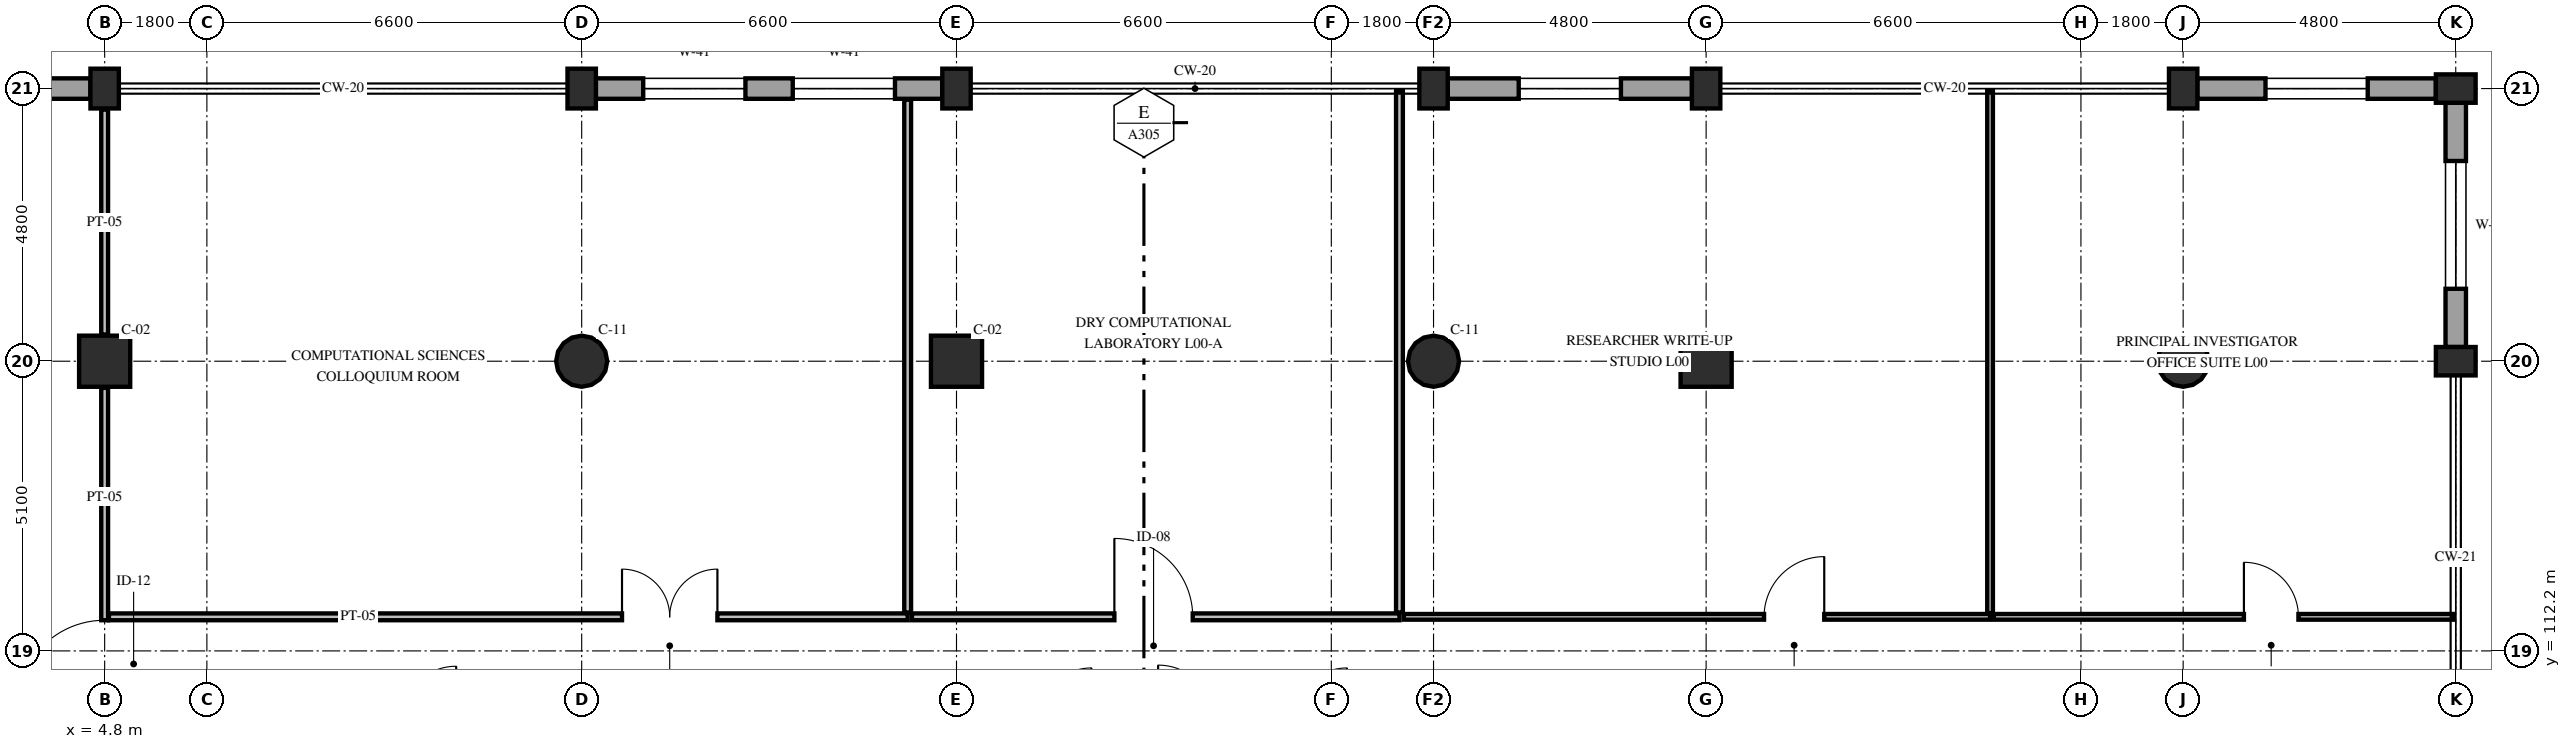
"""IFC4 building model, lengths in metres.
Left out: names, types, materials, properties, quantities, classifications, styles, units other than length and angle.
Written with IfcOpenShell. Run it as: python <this file> out.ifc"""

import sys

from ifc_helpers import new_model, si_unit, direction, frame, frame_2d, origin, origin_2d, place, context, subcontext, project, spatial, rectangle, circle, extrude, element, fill, save


model = new_model("IFC4")
c1 = context("Model", 3, precision=1e-05, world=origin(), true_north=direction((0.0, 1.0)))
c2 = subcontext(c1, "Body", "Model", "MODEL_VIEW")
j1 = project(units=[si_unit("LENGTHUNIT", "METRE"), si_unit("PLANEANGLEUNIT", "RADIAN")], contexts=[c1])
p1 = place(None, origin())
s1 = spatial("IfcSite", under=j1, at=p1, CompositionType="ELEMENT")
p2 = place(p1, origin())
s2 = spatial("IfcBuilding", under=s1, at=p2, CompositionType="ELEMENT")
p3 = place(p2, origin())
s3 = spatial("IfcBuildingStorey", under=s2, at=p3, CompositionType="ELEMENT", Elevation=0.0)
p4 = place(p3, frame((4.8, 117.3, 0.0), z_axis=(0.0, 0.0, 1.0), x_axis=(1.0, 0.0, 0.0)))
e1 = element("IfcColumn", 1, at=p4, inside=s3, PredefinedType="COLUMN", context=c2, shape_type="SweptSolid", body=[
    extrude(rectangle(XDim=0.9, YDim=0.9, at=origin_2d()), origin(), (0.0, 0.0, 1.0), 5.4),
])
p5 = place(p3, frame((4.8, 122.1, 0.0), z_axis=(0.0, 0.0, 1.0), x_axis=(1.0, 0.0, 0.0)))
e2 = element("IfcColumn", 2, at=p5, inside=s3, PredefinedType="PILASTER", context=c2, shape_type="SweptSolid", body=[
    extrude(rectangle(XDim=0.5, YDim=0.7, at=origin_2d()), origin(), (0.0, 0.0, 1.0), 5.4),
])
p6 = place(p3, frame((13.2, 117.3, 0.0), z_axis=(0.0, 0.0, 1.0), x_axis=(1.0, 0.0, 0.0)))
e3 = element("IfcColumn", 3, at=p6, inside=s3, PredefinedType="COLUMN", context=c2, shape_type="SweptSolid", body=[
    extrude(circle(Radius=0.45, at=origin_2d()), origin(), (0.0, 0.0, 1.0), 5.4),
])
p7 = place(p3, frame((13.2, 122.1, 0.0), z_axis=(0.0, 0.0, 1.0), x_axis=(1.0, 0.0, 0.0)))
e4 = element("IfcColumn", 4, at=p7, inside=s3, PredefinedType="PILASTER", context=c2, shape_type="SweptSolid", body=[
    extrude(rectangle(XDim=0.5, YDim=0.7, at=origin_2d()), origin(), (0.0, 0.0, 1.0), 5.4),
])
p8 = place(p3, frame((19.8, 117.3, 0.0), z_axis=(0.0, 0.0, 1.0), x_axis=(1.0, 0.0, 0.0)))
e5 = element("IfcColumn", 5, at=p8, inside=s3, PredefinedType="COLUMN", context=c2, shape_type="SweptSolid", body=[
    extrude(rectangle(XDim=0.9, YDim=0.9, at=origin_2d()), origin(), (0.0, 0.0, 1.0), 5.4),
])
p9 = place(p3, frame((19.8, 122.1, 0.0), z_axis=(0.0, 0.0, 1.0), x_axis=(1.0, 0.0, 0.0)))
e6 = element("IfcColumn", 6, at=p9, inside=s3, PredefinedType="PILASTER", context=c2, shape_type="SweptSolid", body=[
    extrude(rectangle(XDim=0.5, YDim=0.7, at=origin_2d()), origin(), (0.0, 0.0, 1.0), 5.4),
])
p10 = place(p3, frame((28.2, 117.3, 0.0), z_axis=(0.0, 0.0, 1.0), x_axis=(1.0, 0.0, 0.0)))
e7 = element("IfcColumn", 7, at=p10, inside=s3, PredefinedType="COLUMN", context=c2, shape_type="SweptSolid", body=[
    extrude(circle(Radius=0.45, at=origin_2d()), origin(), (0.0, 0.0, 1.0), 5.4),
])
p11 = place(p3, frame((28.2, 122.1, 0.0), z_axis=(0.0, 0.0, 1.0), x_axis=(1.0, 0.0, 0.0)))
e8 = element("IfcColumn", 8, at=p11, inside=s3, PredefinedType="PILASTER", context=c2, shape_type="SweptSolid", body=[
    extrude(rectangle(XDim=0.5, YDim=0.7, at=origin_2d()), origin(), (0.0, 0.0, 1.0), 5.4),
])
p12 = place(p3, frame((33.0, 117.3, 0.0), z_axis=(0.0, 0.0, 1.0), x_axis=(1.0, 0.0, 0.0)))
e9 = element("IfcColumn", 9, at=p12, inside=s3, PredefinedType="COLUMN", context=c2, shape_type="SweptSolid", body=[
    extrude(rectangle(XDim=0.9, YDim=0.9, at=origin_2d()), origin(), (0.0, 0.0, 1.0), 5.4),
])
p13 = place(p3, frame((33.0, 122.1, 0.0), z_axis=(0.0, 0.0, 1.0), x_axis=(1.0, 0.0, 0.0)))
e10 = element("IfcColumn", 10, at=p13, inside=s3, PredefinedType="PILASTER", context=c2, shape_type="SweptSolid", body=[
    extrude(rectangle(XDim=0.5, YDim=0.7, at=origin_2d()), origin(), (0.0, 0.0, 1.0), 5.4),
])
p14 = place(p3, frame((41.4, 117.3, 0.0), z_axis=(0.0, 0.0, 1.0), x_axis=(1.0, 0.0, 0.0)))
e11 = element("IfcColumn", 11, at=p14, inside=s3, PredefinedType="COLUMN", context=c2, shape_type="SweptSolid", body=[
    extrude(circle(Radius=0.45, at=origin_2d()), origin(), (0.0, 0.0, 1.0), 5.4),
])
for number, where, z_axis, x_axis in (
    (12, (41.4, 122.1, 0.0), (0.0, 0.0, 1.0), (1.0, 0.0, 0.0)),
    (13, (46.2, 117.3, 0.0), (0.0, 0.0, 1.0), (0.0, 1.0, 0.0)),
    (14, (46.2, 122.1, 0.0), (0.0, 0.0, 1.0), (0.0, 1.0, 0.0)),
):
    element("IfcColumn", number, at=place(p3, frame(where, z_axis=z_axis, x_axis=x_axis)), inside=s3, PredefinedType="PILASTER", context=c2, shape_type="SweptSolid", body=[
        extrude(rectangle(XDim=0.5, YDim=0.7, at=origin_2d()), origin(), (0.0, 0.0, 1.0), 5.4),
    ])
p15 = place(p3, frame((0.35, 122.1, 0.0), z_axis=(0.0, 0.0, 1.0), x_axis=(1.0, 0.0, 0.0)))
e15 = element("IfcWall", 15, at=p15, inside=s3, PredefinedType="STANDARD", context=c2, shape_type="SweptSolid", body=[
    extrude(rectangle(XDim=4.2, YDim=0.36, at=frame_2d((2.1, 0.0))), origin(), (0.0, 0.0, 1.0), 4.55),
])
p16 = place(p15, frame((1.2, 0.0, 0.85)))
e16 = element("IfcOpeningElement", 16, at=p16, cuts=e15, PredefinedType="OPENING", context=c2, shape_type="SweptSolid", body=[
    extrude(rectangle(XDim=1.8, YDim=2.24, at=frame_2d((0.9, 1.12))), frame((0.0, 0.195, 0.0), z_axis=(0.0, -1.0, 0.0), x_axis=(1.0, 0.0, 0.0)), (0.0, 0.0, 1.0), 0.39),
])
p17 = place(p3, frame((13.45, 122.1, 0.0), z_axis=(0.0, 0.0, 1.0), x_axis=(1.0, 0.0, 0.0)))
e17 = element("IfcWall", 17, at=p17, inside=s3, PredefinedType="STANDARD", context=c2, shape_type="SweptSolid", body=[
    extrude(rectangle(XDim=6.1, YDim=0.36, at=frame_2d((3.05, 0.0))), origin(), (0.0, 0.0, 1.0), 4.53),
])
p18 = place(p17, frame((0.833, 0.0, 0.85)))
e18 = element("IfcOpeningElement", 18, at=p18, cuts=e17, PredefinedType="OPENING", context=c2, shape_type="SweptSolid", body=[
    extrude(rectangle(XDim=1.8, YDim=2.24, at=frame_2d((0.9, 1.12))), frame((0.0, 0.195, 0.0), z_axis=(0.0, -1.0, 0.0), x_axis=(1.0, 0.0, 0.0)), (0.0, 0.0, 1.0), 0.39),
])
p19 = place(p17, frame((3.467, 0.0, 0.85)))
e19 = element("IfcOpeningElement", 19, at=p19, cuts=e17, PredefinedType="OPENING", context=c2, shape_type="SweptSolid", body=[
    extrude(rectangle(XDim=1.8, YDim=2.24, at=frame_2d((0.9, 1.12))), frame((0.0, 0.195, 0.0), z_axis=(0.0, -1.0, 0.0), x_axis=(1.0, 0.0, 0.0)), (0.0, 0.0, 1.0), 0.39),
])
p20 = place(p3, frame((28.45, 122.1, 0.0), z_axis=(0.0, 0.0, 1.0), x_axis=(1.0, 0.0, 0.0)))
e20 = element("IfcWall", 20, at=p20, inside=s3, PredefinedType="STANDARD", context=c2, shape_type="SweptSolid", body=[
    extrude(rectangle(XDim=4.3, YDim=0.36, at=frame_2d((2.15, 0.0))), origin(), (0.0, 0.0, 1.0), 4.55),
])
p21 = place(p20, frame((1.25, 0.0, 0.85)))
e21 = element("IfcOpeningElement", 21, at=p21, cuts=e20, PredefinedType="OPENING", context=c2, shape_type="SweptSolid", body=[
    extrude(rectangle(XDim=1.8, YDim=2.24, at=frame_2d((0.9, 1.12))), frame((0.0, 0.195, 0.0), z_axis=(0.0, -1.0, 0.0), x_axis=(1.0, 0.0, 0.0)), (0.0, 0.0, 1.0), 0.39),
])
p22 = place(p3, frame((41.65, 122.1, 0.0), z_axis=(0.0, 0.0, 1.0), x_axis=(1.0, 0.0, 0.0)))
e22 = element("IfcWall", 22, at=p22, inside=s3, PredefinedType="STANDARD", context=c2, shape_type="SweptSolid", body=[
    extrude(rectangle(XDim=4.2, YDim=0.36, at=frame_2d((2.1, 0.0))), origin(), (0.0, 0.0, 1.0), 4.55),
])
p23 = place(p22, frame((1.2, 0.0, 0.85)))
e23 = element("IfcOpeningElement", 23, at=p23, cuts=e22, PredefinedType="OPENING", context=c2, shape_type="SweptSolid", body=[
    extrude(rectangle(XDim=1.8, YDim=2.24, at=frame_2d((0.9, 1.12))), frame((0.0, 0.195, 0.0), z_axis=(0.0, -1.0, 0.0), x_axis=(1.0, 0.0, 0.0)), (0.0, 0.0, 1.0), 0.39),
])
p24 = place(p3, frame((46.2, 121.85, 0.0), z_axis=(0.0, 0.0, 1.0), x_axis=(0.0, -1.0, 0.0)))
e24 = element("IfcWall", 24, at=p24, inside=s3, PredefinedType="STANDARD", context=c2, shape_type="SweptSolid", body=[
    extrude(rectangle(XDim=4.3, YDim=0.36, at=frame_2d((2.15, 0.0))), origin(), (0.0, 0.0, 1.0), 4.55),
])
p25 = place(p24, frame((1.025, 0.0, 0.85)))
e25 = element("IfcOpeningElement", 25, at=p25, cuts=e24, PredefinedType="OPENING", context=c2, shape_type="SweptSolid", body=[
    extrude(rectangle(XDim=2.25, YDim=2.24, at=frame_2d((1.125, 1.12))), frame((0.0, 0.195, 0.0), z_axis=(0.0, -1.0, 0.0), x_axis=(1.0, 0.0, 0.0)), (0.0, 0.0, 1.0), 0.39),
])
p26 = place(p3, frame((4.8, 110.95, 0.0), z_axis=(0.0, 0.0, 1.0), x_axis=(0.0, 1.0, 0.0)))
e26 = element("IfcWall", 26, at=p26, inside=s3, PredefinedType="PARTITIONING", context=c2, shape_type="SweptSolid", body=[
    extrude(rectangle(XDim=5.88, YDim=0.12, at=frame_2d((2.94, 0.0))), origin(), (0.0, 0.0, 1.0), 4.73),
])
p27 = place(p26, frame((0.25, 0.0, 0.0)))
e27 = element("IfcOpeningElement", 27, at=p27, cuts=e26, PredefinedType="OPENING", context=c2, shape_type="SweptSolid", body=[
    extrude(rectangle(XDim=1.54, YDim=2.25, at=frame_2d((0.77, 1.125))), frame((0.0, 0.075, 0.0), z_axis=(0.0, -1.0, 0.0), x_axis=(1.0, 0.0, 0.0)), (0.0, 0.0, 1.0), 0.15),
])
p28 = place(p3, frame((4.8, 117.77, 0.0), z_axis=(0.0, 0.0, 1.0), x_axis=(0.0, 1.0, 0.0)))
e28 = element("IfcWall", 28, at=p28, inside=s3, PredefinedType="PARTITIONING", context=c2, shape_type="SweptSolid", body=[
    extrude(rectangle(XDim=3.96, YDim=0.12, at=frame_2d((1.98, 0.0))), origin(), (0.0, 0.0, 1.0), 4.73),
])
p29 = place(p3, frame((4.875, 112.8, 0.0), z_axis=(0.0, 0.0, 1.0), x_axis=(1.0, 0.0, 0.0)))
e29 = element("IfcWall", 29, at=p29, inside=s3, PredefinedType="PARTITIONING", context=c2, shape_type="SweptSolid", body=[
    extrude(rectangle(XDim=14.065, YDim=0.12, at=frame_2d((7.032, 0.0))), origin(), (0.0, 0.0, 1.0), 4.73),
])
p30 = place(p29, frame((9.035, 0.0, 0.0)))
e30 = element("IfcOpeningElement", 30, at=p30, cuts=e29, PredefinedType="OPENING", context=c2, shape_type="SweptSolid", body=[
    extrude(rectangle(XDim=1.68, YDim=2.3, at=frame_2d((0.84, 1.15))), frame((0.0, 0.075, 0.0), z_axis=(0.0, -1.0, 0.0), x_axis=(1.0, 0.0, 0.0)), (0.0, 0.0, 1.0), 0.15),
])
p31 = place(p3, frame((18.94, 112.875, 0.0), z_axis=(0.0, 0.0, 1.0), x_axis=(0.0, 1.0, 0.0)))
e31 = element("IfcWall", 31, at=p31, inside=s3, PredefinedType="PARTITIONING", context=c2, shape_type="SweptSolid", body=[
    extrude(rectangle(XDim=9.03, YDim=0.12, at=frame_2d((4.515, 0.0))), origin(), (0.0, 0.0, 1.0), 4.53),
])
p32 = place(p3, frame((19.015, 112.8, 0.0), z_axis=(0.0, 0.0, 1.0), x_axis=(1.0, 0.0, 0.0)))
e32 = element("IfcWall", 32, at=p32, inside=s3, PredefinedType="PARTITIONING", context=c2, shape_type="SweptSolid", body=[
    extrude(rectangle(XDim=8.585, YDim=0.12, at=frame_2d((4.292, 0.0))), origin(), (0.0, 0.0, 1.0), 4.73),
])
p33 = place(p32, frame((3.565, 0.0, 0.0)))
e33 = element("IfcOpeningElement", 33, at=p33, cuts=e32, PredefinedType="OPENING", context=c2, shape_type="SweptSolid", body=[
    extrude(rectangle(XDim=1.38, YDim=2.25, at=frame_2d((0.69, 1.125))), frame((0.0, 0.075, 0.0), z_axis=(0.0, -1.0, 0.0), x_axis=(1.0, 0.0, 0.0)), (0.0, 0.0, 1.0), 0.15),
])
p34 = place(p3, frame((27.6, 112.875, 0.0), z_axis=(0.0, 0.0, 1.0), x_axis=(0.0, 1.0, 0.0)))
e34 = element("IfcWall", 34, at=p34, inside=s3, PredefinedType="PARTITIONING", context=c2, shape_type="SweptSolid", body=[
    extrude(rectangle(XDim=9.185, YDim=0.12, at=frame_2d((4.593, 0.0))), origin(), (0.0, 0.0, 1.0), 4.43),
])
p35 = place(p3, frame((27.675, 112.8, 0.0), z_axis=(0.0, 0.0, 1.0), x_axis=(1.0, 0.0, 0.0)))
e35 = element("IfcWall", 35, at=p35, inside=s3, PredefinedType="PARTITIONING", context=c2, shape_type="SweptSolid", body=[
    extrude(rectangle(XDim=10.325, YDim=0.1, at=frame_2d((5.163, 0.0))), origin(), (0.0, 0.0, 1.0), 4.73),
])
p36 = place(p35, frame((6.345, 0.0, 0.0)))
e36 = element("IfcOpeningElement", 36, at=p36, cuts=e35, PredefinedType="OPENING", context=c2, shape_type="SweptSolid", body=[
    extrude(rectangle(XDim=1.06, YDim=2.2, at=frame_2d((0.53, 1.1))), frame((0.0, 0.065, 0.0), z_axis=(0.0, -1.0, 0.0), x_axis=(1.0, 0.0, 0.0)), (0.0, 0.0, 1.0), 0.13),
])
p37 = place(p3, frame((38.0, 112.865, 0.0), z_axis=(0.0, 0.0, 1.0), x_axis=(0.0, 1.0, 0.0)))
e37 = element("IfcWall", 37, at=p37, inside=s3, PredefinedType="PARTITIONING", context=c2, shape_type="SweptSolid", body=[
    extrude(rectangle(XDim=9.195, YDim=0.1, at=frame_2d((4.598, 0.0))), origin(), (0.0, 0.0, 1.0), 4.43),
])
p38 = place(p3, frame((38.065, 112.8, 0.0), z_axis=(0.0, 0.0, 1.0), x_axis=(1.0, 0.0, 0.0)))
e38 = element("IfcWall", 38, at=p38, inside=s3, PredefinedType="PARTITIONING", context=c2, shape_type="SweptSolid", body=[
    extrude(rectangle(XDim=8.095, YDim=0.1, at=frame_2d((4.047, 0.0))), origin(), (0.0, 0.0, 1.0), 4.68),
])
p39 = place(p38, frame((4.405, 0.0, 0.0)))
e39 = element("IfcOpeningElement", 39, at=p39, cuts=e38, PredefinedType="OPENING", context=c2, shape_type="SweptSolid", body=[
    extrude(rectangle(XDim=0.96, YDim=2.15, at=frame_2d((0.48, 1.075))), frame((0.0, 0.065, 0.0), z_axis=(0.0, -1.0, 0.0), x_axis=(1.0, 0.0, 0.0)), (0.0, 0.0, 1.0), 0.13),
])
p40 = place(p18, origin())
e40 = element("IfcWindow", 40, at=p40, inside=s3, PartitioningType="DOUBLE_PANEL_VERTICAL", PredefinedType="WINDOW", context=c2, shape_type="SweptSolid", body=[
    extrude(rectangle(XDim=1.8, YDim=2.24, at=frame_2d((0.9, 1.12))), frame((0.0, 0.03, 0.0), z_axis=(0.0, -1.0, 0.0), x_axis=(1.0, 0.0, 0.0)), (0.0, 0.0, 1.0), 0.06),
])
fill(e18, e40)
p41 = place(p19, origin())
e41 = element("IfcWindow", 41, at=p41, inside=s3, PartitioningType="DOUBLE_PANEL_VERTICAL", PredefinedType="WINDOW", context=c2, shape_type="SweptSolid", body=[
    extrude(rectangle(XDim=1.8, YDim=2.24, at=frame_2d((0.9, 1.12))), frame((0.0, 0.03, 0.0), z_axis=(0.0, -1.0, 0.0), x_axis=(1.0, 0.0, 0.0)), (0.0, 0.0, 1.0), 0.06),
])
fill(e19, e41)
p42 = place(p21, origin())
e42 = element("IfcWindow", 42, at=p42, inside=s3, PartitioningType="DOUBLE_PANEL_VERTICAL", PredefinedType="WINDOW", context=c2, shape_type="SweptSolid", body=[
    extrude(rectangle(XDim=1.8, YDim=2.24, at=frame_2d((0.9, 1.12))), frame((0.0, 0.03, 0.0), z_axis=(0.0, -1.0, 0.0), x_axis=(1.0, 0.0, 0.0)), (0.0, 0.0, 1.0), 0.06),
])
fill(e21, e42)
p43 = place(p23, origin())
e43 = element("IfcWindow", 43, at=p43, inside=s3, PartitioningType="DOUBLE_PANEL_VERTICAL", PredefinedType="WINDOW", context=c2, shape_type="SweptSolid", body=[
    extrude(rectangle(XDim=1.8, YDim=2.24, at=frame_2d((0.9, 1.12))), frame((0.0, 0.03, 0.0), z_axis=(0.0, -1.0, 0.0), x_axis=(1.0, 0.0, 0.0)), (0.0, 0.0, 1.0), 0.06),
])
fill(e23, e43)
p44 = place(p25, origin())
e44 = element("IfcWindow", 44, at=p44, inside=s3, PartitioningType="DOUBLE_PANEL_VERTICAL", PredefinedType="WINDOW", context=c2, shape_type="SweptSolid", body=[
    extrude(rectangle(XDim=2.25, YDim=2.24, at=frame_2d((1.125, 1.12))), frame((0.0, 0.03, 0.0), z_axis=(0.0, -1.0, 0.0), x_axis=(1.0, 0.0, 0.0)), (0.0, 0.0, 1.0), 0.06),
])
fill(e25, e44)
p45 = place(p27, origin())
e45 = element("IfcDoor", 45, at=p45, inside=s3, OperationType="SINGLE_SWING_LEFT", PredefinedType="DOOR", context=c2, shape_type="SweptSolid", body=[
    extrude(rectangle(XDim=1.54, YDim=2.25, at=frame_2d((0.77, 1.125))), frame((0.0, 0.025, 0.0), z_axis=(0.0, -1.0, 0.0), x_axis=(1.0, 0.0, 0.0)), (0.0, 0.0, 1.0), 0.05),
])
fill(e27, e45)
p46 = place(p30, origin())
e46 = element("IfcDoor", 46, at=p46, inside=s3, OperationType="DOUBLE_DOOR_SINGLE_SWING", PredefinedType="DOOR", context=c2, shape_type="SweptSolid", body=[
    extrude(rectangle(XDim=1.68, YDim=2.3, at=frame_2d((0.84, 1.15))), frame((0.0, 0.025, 0.0), z_axis=(0.0, -1.0, 0.0), x_axis=(1.0, 0.0, 0.0)), (0.0, 0.0, 1.0), 0.05),
])
fill(e30, e46)
p47 = place(p33, origin())
e47 = element("IfcDoor", 47, at=p47, inside=s3, OperationType="SINGLE_SWING_LEFT", PredefinedType="DOOR", context=c2, shape_type="SweptSolid", body=[
    extrude(rectangle(XDim=1.38, YDim=2.25, at=frame_2d((0.69, 1.125))), frame((0.0, 0.025, 0.0), z_axis=(0.0, -1.0, 0.0), x_axis=(1.0, 0.0, 0.0)), (0.0, 0.0, 1.0), 0.05),
])
fill(e33, e47)
p48 = place(p36, origin())
e48 = element("IfcDoor", 48, at=p48, inside=s3, OperationType="SINGLE_SWING_RIGHT", PredefinedType="DOOR", context=c2, shape_type="SweptSolid", body=[
    extrude(rectangle(XDim=1.06, YDim=2.2, at=frame_2d((0.53, 1.1))), frame((0.0, 0.025, 0.0), z_axis=(0.0, -1.0, 0.0), x_axis=(1.0, 0.0, 0.0)), (0.0, 0.0, 1.0), 0.05),
])
fill(e36, e48)
p49 = place(p39, origin())
e49 = element("IfcDoor", 49, at=p49, inside=s3, OperationType="SINGLE_SWING_LEFT", PredefinedType="DOOR", context=c2, shape_type="SweptSolid", body=[
    extrude(rectangle(XDim=0.96, YDim=2.15, at=frame_2d((0.48, 1.075))), frame((0.0, 0.025, 0.0), z_axis=(0.0, -1.0, 0.0), x_axis=(1.0, 0.0, 0.0)), (0.0, 0.0, 1.0), 0.05),
])
fill(e39, e49)
save(model, sys.argv[1])
